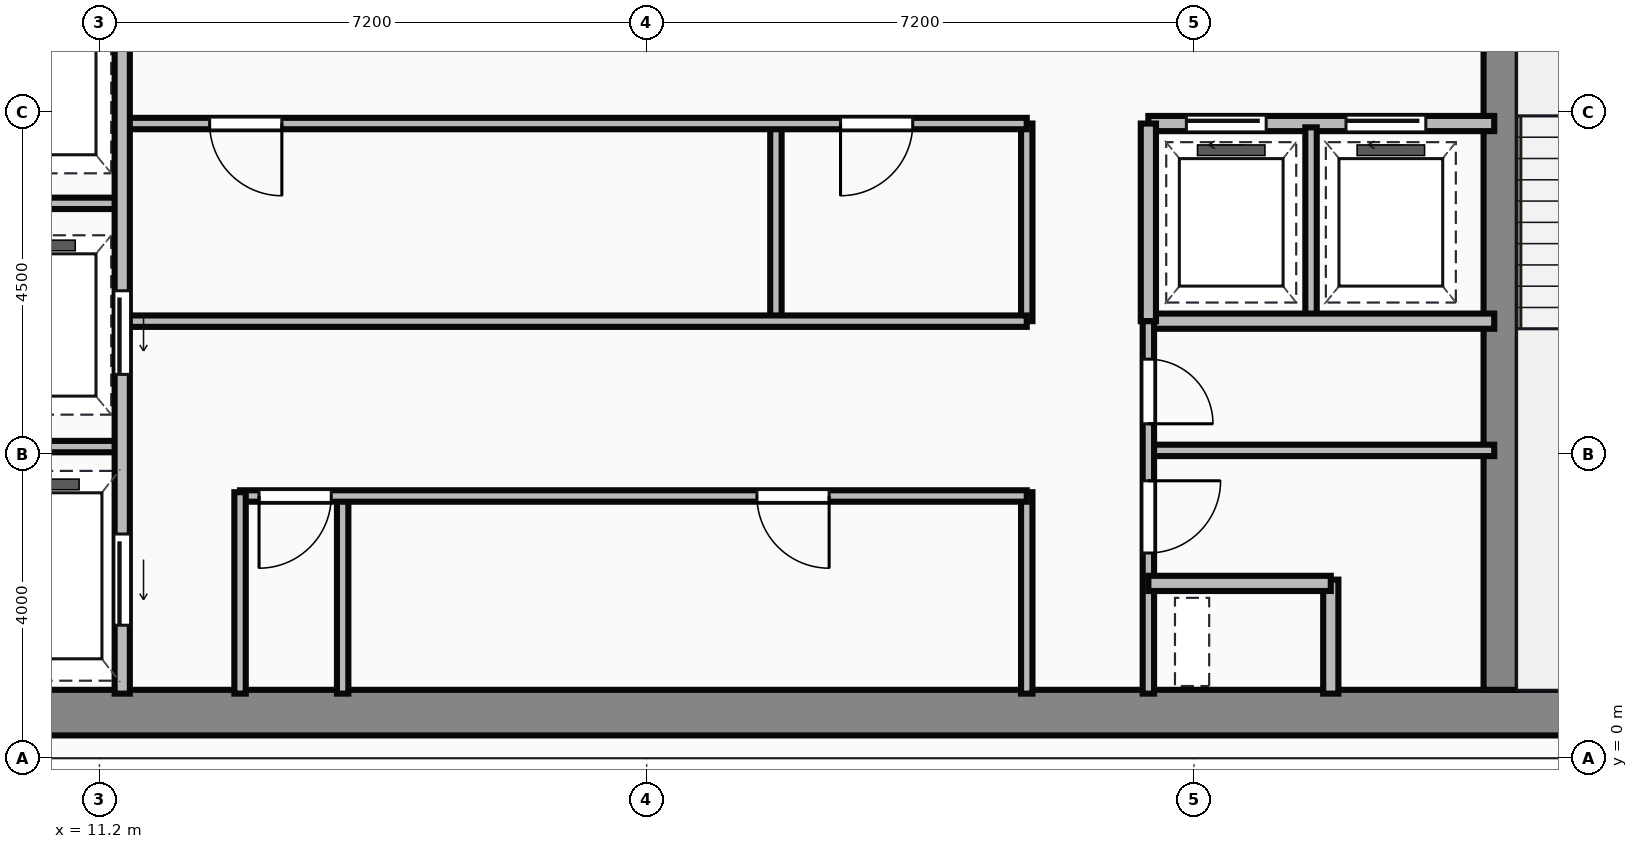
"""IFC4 building model, lengths in metres.
Left out: names, types, materials, properties, quantities, classifications, styles, units other than length and angle.
Written with IfcOpenShell. Run it as: python <this file> out.ifc"""

import sys

from ifc_helpers import new_model, si_unit, direction, frame, frame_2d, origin, place, context, subcontext, project, spatial, rectangle, extrude, source, transform, mapped, element, fill, save


model = new_model("IFC4")
c1 = context("Model", 3, precision=1e-05, world=origin(), true_north=direction((0.0, 1.0)))
c2 = subcontext(c1, "Body", "Model", "MODEL_VIEW")
j1 = project(units=[si_unit("LENGTHUNIT", "METRE"), si_unit("PLANEANGLEUNIT", "RADIAN")], contexts=[c1])
p1 = place(None, origin())
s1 = spatial("IfcSite", under=j1, at=p1, CompositionType="ELEMENT")
p2 = place(p1, origin())
s2 = spatial("IfcBuilding", under=s1, at=p2, CompositionType="ELEMENT")
p3 = place(p2, frame((0.0, 0.0, 258.8)))
s3 = spatial("IfcBuildingStorey", under=s2, at=p3, CompositionType="ELEMENT", Elevation=258.8)
m1 = source(origin(), c2, "Body", "SweptSolid", [
    extrude(rectangle(XDim=29.5, YDim=0.6, at=frame_2d((14.75, 0.0))), origin(), (0.0, 0.0, 1.0), 3.65),
])
p4 = place(p3, frame((4.5, 0.6, 0.0), z_axis=(0.0, 0.0, 1.0), x_axis=(1.0, 0.0, 0.0)))
e1 = element("IfcWall", 1, at=p4, inside=s3, PredefinedType="SHEAR", context=c2, shape_type="MappedRepresentation", body=[
    mapped(m1, transform((0.0, 0.0, 0.0))),
])
m2 = source(origin(), c2, "Body", "SweptSolid", [
    extrude(rectangle(XDim=12.5, YDim=0.45, at=frame_2d((6.25, 0.0))), origin(), (0.0, 0.0, 1.0), 3.65),
])
p5 = place(p3, frame((29.635, 0.9, 0.0), z_axis=(0.0, 0.0, 1.0), x_axis=(0.0, 1.0, 0.0)))
e2 = element("IfcWall", 2, at=p5, inside=s3, PredefinedType="SHEAR", context=c2, shape_type="MappedRepresentation", body=[
    mapped(m2, transform((0.0, 0.0, 0.0))),
])
m3 = source(origin(), c2, "Body", "SweptSolid", [
    extrude(rectangle(XDim=9.6, YDim=0.2, at=frame_2d((4.8, 0.0))), origin(), (0.0, 0.0, 1.0), 3.4),
])
p6 = place(p3, frame((11.5, 0.85, 0.0), z_axis=(0.0, 0.0, 1.0), x_axis=(0.0, 1.0, 0.0)))
e3 = element("IfcWall", 3, at=p6, inside=s3, PredefinedType="PARTITIONING", context=c2, shape_type="MappedRepresentation", body=[
    mapped(m3, transform((0.0, 0.0, 0.0))),
])
p7 = place(p6, frame((4.2, 0.0, 0.0)))
e4 = element("IfcOpeningElement", 4, at=p7, cuts=e3, PredefinedType="OPENING", context=c2, shape_type="SweptSolid", body=[
    extrude(rectangle(XDim=1.1, YDim=2.15, at=frame_2d((0.55, 1.075))), frame((0.0, 0.11, 0.0), z_axis=(0.0, -1.0, 0.0), x_axis=(1.0, 0.0, 0.0)), (0.0, 0.0, 1.0), 0.22),
])
p8 = place(p6, frame((0.9, 0.0, 0.0)))
e5 = element("IfcOpeningElement", 5, at=p8, cuts=e3, PredefinedType="OPENING", context=c2, shape_type="SweptSolid", body=[
    extrude(rectangle(XDim=1.2, YDim=2.15, at=frame_2d((0.6, 1.075))), frame((0.0, 0.11, 0.0), z_axis=(0.0, -1.0, 0.0), x_axis=(1.0, 0.0, 0.0)), (0.0, 0.0, 1.0), 0.22),
])
m4 = source(origin(), c2, "Body", "SweptSolid", [
    extrude(rectangle(XDim=2.4, YDim=0.15, at=frame_2d((1.2, 0.0))), origin(), (0.0, 0.0, 1.0), 3.4),
])
for number, where, z_axis, x_axis in (
    (6, (9.1, 4.1, 0.0), (0.0, 0.0, 1.0), (1.0, 0.0, 0.0)),
    (7, (9.1, 7.3, 0.0), (0.0, 0.0, 1.0), (1.0, 0.0, 0.0)),
):
    element("IfcWall", number, at=place(p3, frame(where, z_axis=z_axis, x_axis=x_axis)), inside=s3, PredefinedType="PARTITIONING", context=c2, shape_type="MappedRepresentation", body=[
        mapped(m4, transform((0.0, 0.0, 0.0))),
    ])
m5 = source(origin(), c2, "Body", "SweptSolid", [
    extrude(rectangle(XDim=2.65, YDim=0.15, at=frame_2d((1.325, 0.0))), origin(), (0.0, 0.0, 1.0), 3.4),
])
p9 = place(p3, frame((13.05, 0.85, 0.0), z_axis=(0.0, 0.0, 1.0), x_axis=(0.0, 1.0, 0.0)))
e8 = element("IfcWall", 8, at=p9, inside=s3, PredefinedType="PARTITIONING", context=c2, shape_type="MappedRepresentation", body=[
    mapped(m5, transform((0.0, 0.0, 0.0))),
])
m6 = source(origin(), c2, "Body", "SweptSolid", [
    extrude(rectangle(XDim=10.35, YDim=0.15, at=frame_2d((5.175, 0.0))), origin(), (0.0, 0.0, 1.0), 3.4),
])
p10 = place(p3, frame((13.05, 3.45, 0.0), z_axis=(0.0, 0.0, 1.0), x_axis=(1.0, 0.0, 0.0)))
e9 = element("IfcWall", 9, at=p10, inside=s3, PredefinedType="PARTITIONING", context=c2, shape_type="MappedRepresentation", body=[
    mapped(m6, transform((0.0, 0.0, 0.0))),
])
p11 = place(p10, frame((0.25, 0.0, 0.0)))
e10 = element("IfcOpeningElement", 10, at=p11, cuts=e9, PredefinedType="OPENING", context=c2, shape_type="SweptSolid", body=[
    extrude(rectangle(XDim=0.95, YDim=2.15, at=frame_2d((0.475, 1.075))), frame((0.0, 0.085, 0.0), z_axis=(0.0, -1.0, 0.0), x_axis=(1.0, 0.0, 0.0)), (0.0, 0.0, 1.0), 0.17),
])
p12 = place(p10, frame((6.8, 0.0, 0.0)))
e11 = element("IfcOpeningElement", 11, at=p12, cuts=e9, PredefinedType="OPENING", context=c2, shape_type="SweptSolid", body=[
    extrude(rectangle(XDim=0.95, YDim=2.15, at=frame_2d((0.475, 1.075))), frame((0.0, 0.085, 0.0), z_axis=(0.0, -1.0, 0.0), x_axis=(1.0, 0.0, 0.0)), (0.0, 0.0, 1.0), 0.17),
])
p13 = place(p3, frame((23.4, 0.85, 0.0), z_axis=(0.0, 0.0, 1.0), x_axis=(0.0, 1.0, 0.0)))
e12 = element("IfcWall", 12, at=p13, inside=s3, PredefinedType="PARTITIONING", context=c2, shape_type="MappedRepresentation", body=[
    mapped(m5, transform((0.0, 0.0, 0.0))),
])
m7 = source(origin(), c2, "Body", "SweptSolid", [
    extrude(rectangle(XDim=2.6, YDim=0.15, at=frame_2d((1.3, 0.0))), origin(), (0.0, 0.0, 1.0), 3.4),
])
p14 = place(p3, frame((14.4, 0.85, 0.0), z_axis=(0.0, 0.0, 1.0), x_axis=(0.0, 1.0, 0.0)))
e13 = element("IfcWall", 13, at=p14, inside=s3, PredefinedType="PARTITIONING", context=c2, shape_type="MappedRepresentation", body=[
    mapped(m7, transform((0.0, 0.0, 0.0))),
])
m8 = source(origin(), c2, "Body", "SweptSolid", [
    extrude(rectangle(XDim=11.85, YDim=0.15, at=frame_2d((5.925, 0.0))), origin(), (0.0, 0.0, 1.0), 3.4),
])
p15 = place(p3, frame((11.55, 5.75, 0.0), z_axis=(0.0, 0.0, 1.0), x_axis=(1.0, 0.0, 0.0)))
e14 = element("IfcWall", 14, at=p15, inside=s3, PredefinedType="PARTITIONING", context=c2, shape_type="MappedRepresentation", body=[
    mapped(m8, transform((0.0, 0.0, 0.0))),
])
p16 = place(p3, frame((11.55, 8.35, 0.0), z_axis=(0.0, 0.0, 1.0), x_axis=(1.0, 0.0, 0.0)))
e15 = element("IfcWall", 15, at=p16, inside=s3, PredefinedType="PARTITIONING", context=c2, shape_type="MappedRepresentation", body=[
    mapped(m8, transform((0.0, 0.0, 0.0))),
])
p17 = place(p16, frame((1.1, 0.0, 0.0)))
e16 = element("IfcOpeningElement", 16, at=p17, cuts=e15, PredefinedType="OPENING", context=c2, shape_type="SweptSolid", body=[
    extrude(rectangle(XDim=0.95, YDim=2.15, at=frame_2d((0.475, 1.075))), frame((0.0, 0.085, 0.0), z_axis=(0.0, -1.0, 0.0), x_axis=(1.0, 0.0, 0.0)), (0.0, 0.0, 1.0), 0.17),
])
p18 = place(p16, frame((9.4, 0.0, 0.0)))
e17 = element("IfcOpeningElement", 17, at=p18, cuts=e15, PredefinedType="OPENING", context=c2, shape_type="SweptSolid", body=[
    extrude(rectangle(XDim=0.95, YDim=2.15, at=frame_2d((0.475, 1.075))), frame((0.0, 0.085, 0.0), z_axis=(0.0, -1.0, 0.0), x_axis=(1.0, 0.0, 0.0)), (0.0, 0.0, 1.0), 0.17),
])
m9 = source(origin(), c2, "Body", "SweptSolid", [
    extrude(rectangle(XDim=2.6, YDim=0.15, at=frame_2d((1.3, 0.0))), origin(), (0.0, 0.0, 1.0), 3.4),
])
p19 = place(p3, frame((23.4, 5.75, 0.0), z_axis=(0.0, 0.0, 1.0), x_axis=(0.0, 1.0, 0.0)))
e18 = element("IfcWall", 18, at=p19, inside=s3, PredefinedType="PARTITIONING", context=c2, shape_type="MappedRepresentation", body=[
    mapped(m9, transform((0.0, 0.0, 0.0))),
])
m10 = source(origin(), c2, "Body", "SweptSolid", [
    extrude(rectangle(XDim=2.5, YDim=0.15, at=frame_2d((1.25, 0.0))), origin(), (0.0, 0.0, 1.0), 3.4),
])
p20 = place(p3, frame((20.1, 5.8, 0.0), z_axis=(0.0, 0.0, 1.0), x_axis=(0.0, 1.0, 0.0)))
e19 = element("IfcWall", 19, at=p20, inside=s3, PredefinedType="PARTITIONING", context=c2, shape_type="MappedRepresentation", body=[
    mapped(m10, transform((0.0, 0.0, 0.0))),
])
m11 = source(origin(), c2, "Body", "SweptSolid", [
    extrude(rectangle(XDim=4.55, YDim=0.2, at=frame_2d((2.275, 0.0))), origin(), (0.0, 0.0, 1.0), 3.4),
])
p21 = place(p3, frame((25.0, 8.35, 0.0), z_axis=(0.0, 0.0, 1.0), x_axis=(1.0, 0.0, 0.0)))
e20 = element("IfcWall", 20, at=p21, inside=s3, PredefinedType="PARTITIONING", context=c2, shape_type="MappedRepresentation", body=[
    mapped(m11, transform((0.0, 0.0, 0.0))),
])
p22 = place(p21, frame((0.5, 0.0, 0.0)))
e21 = element("IfcOpeningElement", 21, at=p22, cuts=e20, PredefinedType="OPENING", context=c2, shape_type="SweptSolid", body=[
    extrude(rectangle(XDim=1.05, YDim=2.15, at=frame_2d((0.525, 1.075))), frame((0.0, 0.11, 0.0), z_axis=(0.0, -1.0, 0.0), x_axis=(1.0, 0.0, 0.0)), (0.0, 0.0, 1.0), 0.22),
])
p23 = place(p21, frame((2.6, 0.0, 0.0)))
e22 = element("IfcOpeningElement", 22, at=p23, cuts=e20, PredefinedType="OPENING", context=c2, shape_type="SweptSolid", body=[
    extrude(rectangle(XDim=1.05, YDim=2.15, at=frame_2d((0.525, 1.075))), frame((0.0, 0.11, 0.0), z_axis=(0.0, -1.0, 0.0), x_axis=(1.0, 0.0, 0.0)), (0.0, 0.0, 1.0), 0.22),
])
p24 = place(p3, frame((25.0, 5.75, 0.0), z_axis=(0.0, 0.0, 1.0), x_axis=(1.0, 0.0, 0.0)))
e23 = element("IfcWall", 23, at=p24, inside=s3, PredefinedType="PARTITIONING", context=c2, shape_type="MappedRepresentation", body=[
    mapped(m11, transform((0.0, 0.0, 0.0))),
])
m12 = source(origin(), c2, "Body", "SweptSolid", [
    extrude(rectangle(XDim=2.6, YDim=0.2, at=frame_2d((1.3, 0.0))), origin(), (0.0, 0.0, 1.0), 3.4),
])
p25 = place(p3, frame((25.0, 5.75, 0.0), z_axis=(0.0, 0.0, 1.0), x_axis=(0.0, 1.0, 0.0)))
e24 = element("IfcWall", 24, at=p25, inside=s3, PredefinedType="PARTITIONING", context=c2, shape_type="MappedRepresentation", body=[
    mapped(m12, transform((0.0, 0.0, 0.0))),
])
p26 = place(p3, frame((27.14, 5.8, 0.0), z_axis=(0.0, 0.0, 1.0), x_axis=(0.0, 1.0, 0.0)))
e25 = element("IfcWall", 25, at=p26, inside=s3, PredefinedType="PARTITIONING", context=c2, shape_type="MappedRepresentation", body=[
    mapped(m10, transform((0.0, 0.0, 0.0))),
])
m13 = source(origin(), c2, "Body", "SweptSolid", [
    extrude(rectangle(XDim=4.9, YDim=0.15, at=frame_2d((2.45, 0.0))), origin(), (0.0, 0.0, 1.0), 3.4),
])
p27 = place(p3, frame((25.0, 0.85, 0.0), z_axis=(0.0, 0.0, 1.0), x_axis=(0.0, 1.0, 0.0)))
e26 = element("IfcWall", 26, at=p27, inside=s3, PredefinedType="PARTITIONING", context=c2, shape_type="MappedRepresentation", body=[
    mapped(m13, transform((0.0, 0.0, 0.0))),
])
p28 = place(p27, frame((1.85, 0.0, 0.0)))
e27 = element("IfcOpeningElement", 27, at=p28, cuts=e26, PredefinedType="OPENING", context=c2, shape_type="SweptSolid", body=[
    extrude(rectangle(XDim=0.95, YDim=2.15, at=frame_2d((0.475, 1.075))), frame((0.0, 0.085, 0.0), z_axis=(0.0, -1.0, 0.0), x_axis=(1.0, 0.0, 0.0)), (0.0, 0.0, 1.0), 0.17),
])
p29 = place(p27, frame((3.55, 0.0, 0.0)))
e28 = element("IfcOpeningElement", 28, at=p29, cuts=e26, PredefinedType="OPENING", context=c2, shape_type="SweptSolid", body=[
    extrude(rectangle(XDim=0.85, YDim=2.15, at=frame_2d((0.425, 1.075))), frame((0.0, 0.085, 0.0), z_axis=(0.0, -1.0, 0.0), x_axis=(1.0, 0.0, 0.0)), (0.0, 0.0, 1.0), 0.17),
])
m14 = source(origin(), c2, "Body", "SweptSolid", [
    extrude(rectangle(XDim=2.4, YDim=0.2, at=frame_2d((1.2, 0.0))), origin(), (0.0, 0.0, 1.0), 3.4),
])
p30 = place(p3, frame((25.0, 2.3, 0.0), z_axis=(0.0, 0.0, 1.0), x_axis=(1.0, 0.0, 0.0)))
e29 = element("IfcWall", 29, at=p30, inside=s3, PredefinedType="PARTITIONING", context=c2, shape_type="MappedRepresentation", body=[
    mapped(m14, transform((0.0, 0.0, 0.0))),
])
m15 = source(origin(), c2, "Body", "SweptSolid", [
    extrude(rectangle(XDim=1.5, YDim=0.2, at=frame_2d((0.75, 0.0))), origin(), (0.0, 0.0, 1.0), 3.4),
])
p31 = place(p3, frame((27.4, 0.85, 0.0), z_axis=(0.0, 0.0, 1.0), x_axis=(0.0, 1.0, 0.0)))
e30 = element("IfcWall", 30, at=p31, inside=s3, PredefinedType="PARTITIONING", context=c2, shape_type="MappedRepresentation", body=[
    mapped(m15, transform((0.0, 0.0, 0.0))),
])
m16 = source(origin(), c2, "Body", "SweptSolid", [
    extrude(rectangle(XDim=4.55, YDim=0.15, at=frame_2d((2.275, 0.0))), origin(), (0.0, 0.0, 1.0), 3.4),
])
p32 = place(p3, frame((25.0, 4.05, 0.0), z_axis=(0.0, 0.0, 1.0), x_axis=(1.0, 0.0, 0.0)))
e31 = element("IfcWall", 31, at=p32, inside=s3, PredefinedType="PARTITIONING", context=c2, shape_type="MappedRepresentation", body=[
    mapped(m16, transform((0.0, 0.0, 0.0))),
])
m17 = source(origin(), c2, "Body", "SweptSolid", [
    extrude(rectangle(XDim=1.1, YDim=2.15, at=frame_2d((0.55, 1.075))), frame((0.0, 0.025, 0.0), z_axis=(0.0, -1.0, 0.0), x_axis=(1.0, 0.0, 0.0)), (0.0, 0.0, 1.0), 0.05),
])
p33 = place(p7, frame((1.1, 0.0, 0.0), z_axis=(0.0, 0.0, 1.0), x_axis=(-1.0, 0.0, 0.0)))
e32 = element("IfcDoor", 32, at=p33, inside=s3, OperationType="SLIDING_TO_LEFT", PredefinedType="DOOR", context=c2, shape_type="MappedRepresentation", body=[
    mapped(m17, transform((0.0, 0.0, 0.0))),
])
fill(e4, e32)
m18 = source(origin(), c2, "Body", "SweptSolid", [
    extrude(rectangle(XDim=1.2, YDim=2.15, at=frame_2d((0.6, 1.075))), frame((0.0, 0.025, 0.0), z_axis=(0.0, -1.0, 0.0), x_axis=(1.0, 0.0, 0.0)), (0.0, 0.0, 1.0), 0.05),
])
p34 = place(p8, frame((1.2, 0.0, 0.0), z_axis=(0.0, 0.0, 1.0), x_axis=(-1.0, 0.0, 0.0)))
e33 = element("IfcDoor", 33, at=p34, inside=s3, OperationType="SLIDING_TO_LEFT", PredefinedType="DOOR", context=c2, shape_type="MappedRepresentation", body=[
    mapped(m18, transform((0.0, 0.0, 0.0))),
])
fill(e5, e33)
m19 = source(origin(), c2, "Body", "SweptSolid", [
    extrude(rectangle(XDim=0.95, YDim=2.15, at=frame_2d((0.475, 1.075))), frame((0.0, 0.025, 0.0), z_axis=(0.0, -1.0, 0.0), x_axis=(1.0, 0.0, 0.0)), (0.0, 0.0, 1.0), 0.05),
])
p35 = place(p11, origin())
e34 = element("IfcDoor", 34, at=p35, inside=s3, OperationType="SINGLE_SWING_LEFT", PredefinedType="DOOR", context=c2, shape_type="MappedRepresentation", body=[
    mapped(m19, transform((0.0, 0.0, 0.0))),
])
fill(e10, e34)
p36 = place(p12, origin())
e35 = element("IfcDoor", 35, at=p36, inside=s3, OperationType="SINGLE_SWING_RIGHT", PredefinedType="DOOR", context=c2, shape_type="MappedRepresentation", body=[
    mapped(m19, transform((0.0, 0.0, 0.0))),
])
fill(e11, e35)
p37 = place(p17, origin())
e36 = element("IfcDoor", 36, at=p37, inside=s3, OperationType="SINGLE_SWING_RIGHT", PredefinedType="DOOR", context=c2, shape_type="MappedRepresentation", body=[
    mapped(m19, transform((0.0, 0.0, 0.0))),
])
fill(e16, e36)
p38 = place(p18, origin())
e37 = element("IfcDoor", 37, at=p38, inside=s3, OperationType="SINGLE_SWING_LEFT", PredefinedType="DOOR", context=c2, shape_type="MappedRepresentation", body=[
    mapped(m19, transform((0.0, 0.0, 0.0))),
])
fill(e17, e37)
m20 = source(origin(), c2, "Body", "SweptSolid", [
    extrude(rectangle(XDim=1.05, YDim=2.15, at=frame_2d((0.525, 1.075))), frame((0.0, 0.025, 0.0), z_axis=(0.0, -1.0, 0.0), x_axis=(1.0, 0.0, 0.0)), (0.0, 0.0, 1.0), 0.05),
])
p39 = place(p22, origin())
e38 = element("IfcDoor", 38, at=p39, inside=s3, OperationType="SLIDING_TO_LEFT", PredefinedType="DOOR", context=c2, shape_type="MappedRepresentation", body=[
    mapped(m20, transform((0.0, 0.0, 0.0))),
])
fill(e21, e38)
p40 = place(p23, origin())
e39 = element("IfcDoor", 39, at=p40, inside=s3, OperationType="SLIDING_TO_LEFT", PredefinedType="DOOR", context=c2, shape_type="MappedRepresentation", body=[
    mapped(m20, transform((0.0, 0.0, 0.0))),
])
fill(e22, e39)
p41 = place(p28, origin())
e40 = element("IfcDoor", 40, at=p41, inside=s3, OperationType="SINGLE_SWING_RIGHT", PredefinedType="DOOR", context=c2, shape_type="MappedRepresentation", body=[
    mapped(m19, transform((0.0, 0.0, 0.0))),
])
fill(e27, e40)
m21 = source(origin(), c2, "Body", "SweptSolid", [
    extrude(rectangle(XDim=0.85, YDim=2.15, at=frame_2d((0.425, 1.075))), frame((0.0, 0.025, 0.0), z_axis=(0.0, -1.0, 0.0), x_axis=(1.0, 0.0, 0.0)), (0.0, 0.0, 1.0), 0.05),
])
p42 = place(p29, origin())
e41 = element("IfcDoor", 41, at=p42, inside=s3, OperationType="SINGLE_SWING_LEFT", PredefinedType="DOOR", context=c2, shape_type="MappedRepresentation", body=[
    mapped(m21, transform((0.0, 0.0, 0.0))),
])
fill(e28, e41)
save(model, sys.argv[1])
